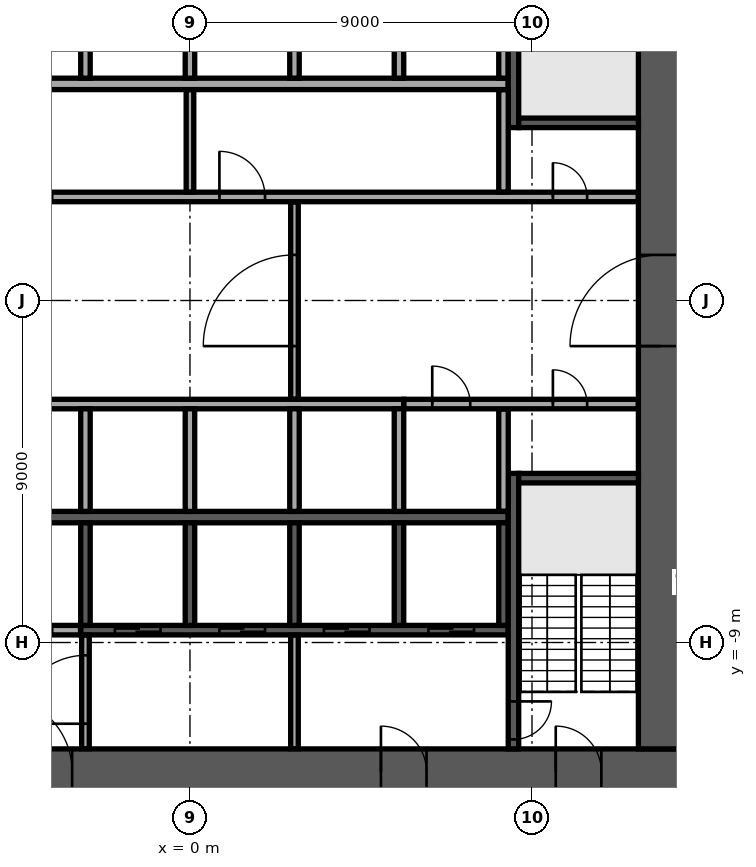
"""IFC4 building model, lengths in metres.
Left out: names, types, materials, properties, quantities, classifications, styles, units other than length and angle.
Written with IfcOpenShell. Run it as: python <this file> out.ifc"""

import sys

from ifc_helpers import new_model, si_unit, direction, frame, frame_2d, origin, place, context, subcontext, project, spatial, rectangle, extrude, element, fill, save


model = new_model("IFC4")
c1 = context("Model", 3, precision=1e-05, world=origin(), true_north=direction((0.0, 1.0)))
c2 = subcontext(c1, "Body", "Model", "MODEL_VIEW")
j1 = project(units=[si_unit("LENGTHUNIT", "METRE"), si_unit("PLANEANGLEUNIT", "RADIAN")], contexts=[c1])
p1 = place(None, origin())
s1 = spatial("IfcSite", under=j1, at=p1, CompositionType="ELEMENT")
p2 = place(p1, origin())
s2 = spatial("IfcBuilding", under=s1, at=p2, CompositionType="ELEMENT")
p3 = place(p2, frame((0.0, 0.0, 68.1)))
s3 = spatial("IfcBuildingStorey", under=s2, at=p3, CompositionType="ELEMENT", Elevation=68.1)
p4 = place(p3, frame((-13.0, -12.4, 0.0), z_axis=(0.0, 0.0, 1.0), x_axis=(1.0, 0.0, 0.0)))
e1 = element("IfcWall", 1, at=p4, inside=s3, PredefinedType="SHEAR", context=c2, shape_type="SweptSolid", body=[
    extrude(rectangle(XDim=26.0, YDim=1.2, at=frame_2d((13.0, 0.0))), origin(), (0.0, 0.0, 1.0), 3.75),
])
p5 = place(p4, frame((7.9, 0.0, 0.0)))
e2 = element("IfcOpeningElement", 2, at=p5, cuts=e1, PredefinedType="OPENING", context=c2, shape_type="SweptSolid", body=[
    extrude(rectangle(XDim=2.0, YDim=2.1, at=frame_2d((1.0, 1.05))), frame((0.0, 0.61, 0.0), z_axis=(0.0, -1.0, 0.0), x_axis=(1.0, 0.0, 0.0)), (0.0, 0.0, 1.0), 1.22),
])
p6 = place(p4, frame((18.025, 0.0, 0.0)))
e3 = element("IfcOpeningElement", 3, at=p6, cuts=e1, PredefinedType="OPENING", context=c2, shape_type="SweptSolid", body=[
    extrude(rectangle(XDim=1.2, YDim=2.1, at=frame_2d((0.6, 1.05))), frame((0.0, 0.61, 0.0), z_axis=(0.0, -1.0, 0.0), x_axis=(1.0, 0.0, 0.0)), (0.0, 0.0, 1.0), 1.22),
])
p7 = place(p4, frame((2.175, 0.0, 0.0)))
e4 = element("IfcOpeningElement", 4, at=p7, cuts=e1, PredefinedType="OPENING", context=c2, shape_type="SweptSolid", body=[
    extrude(rectangle(XDim=1.2, YDim=2.1, at=frame_2d((0.6, 1.05))), frame((0.0, 0.61, 0.0), z_axis=(0.0, -1.0, 0.0), x_axis=(1.0, 0.0, 0.0)), (0.0, 0.0, 1.0), 1.22),
])
p8 = place(p4, frame((22.625, 0.0, 0.0)))
e5 = element("IfcOpeningElement", 5, at=p8, cuts=e1, PredefinedType="OPENING", context=c2, shape_type="SweptSolid", body=[
    extrude(rectangle(XDim=1.2, YDim=2.1, at=frame_2d((0.6, 1.05))), frame((0.0, 0.61, 0.0), z_axis=(0.0, -1.0, 0.0), x_axis=(1.0, 0.0, 0.0)), (0.0, 0.0, 1.0), 1.22),
])
p9 = place(p3, frame((12.4, -11.8, 0.0), z_axis=(0.0, 0.0, 1.0), x_axis=(0.0, 1.0, 0.0)))
e6 = element("IfcWall", 6, at=p9, inside=s3, PredefinedType="SHEAR", context=c2, shape_type="SweptSolid", body=[
    extrude(rectangle(XDim=23.6, YDim=1.2, at=frame_2d((11.8, 0.0))), origin(), (0.0, 0.0, 1.0), 3.75),
])
p10 = place(p9, frame((10.6, 0.0, 0.0)))
e7 = element("IfcOpeningElement", 7, at=p10, cuts=e6, PredefinedType="OPENING", context=c2, shape_type="SweptSolid", body=[
    extrude(rectangle(XDim=2.4, YDim=2.4, at=frame_2d((1.2, 1.2))), frame((0.0, 0.61, 0.0), z_axis=(0.0, -1.0, 0.0), x_axis=(1.0, 0.0, 0.0)), (0.0, 0.0, 1.0), 1.22),
])
for number, where, z_axis, x_axis in (
    (8, (-8.375, 5.7, 0.0), (0.0, 0.0, 1.0), (1.0, 0.0, 0.0)),
    (9, (-8.375, -5.7, 0.0), (0.0, 0.0, 1.0), (1.0, 0.0, 0.0)),
):
    element("IfcWall", number, at=place(p3, frame(where, z_axis=z_axis, x_axis=x_axis)), inside=s3, PredefinedType="SOLIDWALL", context=c2, shape_type="SweptSolid", body=[
        extrude(rectangle(XDim=16.75, YDim=0.3, at=frame_2d((8.375, 0.0))), origin(), (0.0, 0.0, 1.0), 3.75),
    ])
for number, where, z_axis, x_axis in (
    (10, (-2.75, 5.85, 0.0), (0.0, 0.0, 1.0), (0.0, 1.0, 0.0)),
    (11, (0.0, 5.85, 0.0), (0.0, 0.0, 1.0), (0.0, 1.0, 0.0)),
    (12, (2.75, 5.85, 0.0), (0.0, 0.0, 1.0), (0.0, 1.0, 0.0)),
    (13, (5.5, 5.85, 0.0), (0.0, 0.0, 1.0), (0.0, 1.0, 0.0)),
    (14, (8.25, 5.85, 0.0), (0.0, 0.0, 1.0), (0.0, 1.0, 0.0)),
):
    element("IfcWall", number, at=place(p3, frame(where, z_axis=z_axis, x_axis=x_axis)), inside=s3, PredefinedType="SOLIDWALL", context=c2, shape_type="SweptSolid", body=[
        extrude(rectangle(XDim=2.7, YDim=0.25, at=frame_2d((1.35, 0.0))), origin(), (0.0, 0.0, 1.0), 3.75),
    ])
p11 = place(p3, frame((-8.375, -2.725, 0.0), z_axis=(0.0, 0.0, 1.0), x_axis=(1.0, 0.0, 0.0)))
e15 = element("IfcWall", 15, at=p11, inside=s3, PredefinedType="SOLIDWALL", context=c2, shape_type="SweptSolid", body=[
    extrude(rectangle(XDim=14.0, YDim=0.25, at=frame_2d((7.0, 0.0))), origin(), (0.0, 0.0, 1.0), 3.75),
])
for number, where, z_axis, x_axis in (
    (16, (-2.75, -5.55, 0.0), (0.0, 0.0, 1.0), (0.0, 1.0, 0.0)),
    (17, (0.0, -5.55, 0.0), (0.0, 0.0, 1.0), (0.0, 1.0, 0.0)),
    (18, (2.75, -5.55, 0.0), (0.0, 0.0, 1.0), (0.0, 1.0, 0.0)),
    (19, (5.5, -5.55, 0.0), (0.0, 0.0, 1.0), (0.0, 1.0, 0.0)),
):
    element("IfcWall", number, at=place(p3, frame(where, z_axis=z_axis, x_axis=x_axis)), inside=s3, PredefinedType="SOLIDWALL", context=c2, shape_type="SweptSolid", body=[
        extrude(rectangle(XDim=2.7, YDim=0.25, at=frame_2d((1.35, 0.0))), origin(), (0.0, 0.0, 1.0), 3.75),
    ])
p12 = place(p3, frame((-2.875, -8.675, 0.0), z_axis=(0.0, 0.0, 1.0), x_axis=(1.0, 0.0, 0.0)))
e20 = element("IfcWall", 20, at=p12, inside=s3, PredefinedType="SOLIDWALL", context=c2, shape_type="SweptSolid", body=[
    extrude(rectangle(XDim=11.25, YDim=0.25, at=frame_2d((5.625, 0.0))), origin(), (0.0, 0.0, 1.0), 3.75),
])
p13 = place(p12, frame((0.9, 0.0, 0.0)))
e21 = element("IfcOpeningElement", 21, at=p13, cuts=e20, PredefinedType="OPENING", context=c2, shape_type="SweptSolid", body=[
    extrude(rectangle(XDim=1.2, YDim=2.1, at=frame_2d((0.6, 1.05))), frame((0.0, 0.135, 0.0), z_axis=(0.0, -1.0, 0.0), x_axis=(1.0, 0.0, 0.0)), (0.0, 0.0, 1.0), 0.27),
])
p14 = place(p12, frame((3.65, 0.0, 0.0)))
e22 = element("IfcOpeningElement", 22, at=p14, cuts=e20, PredefinedType="OPENING", context=c2, shape_type="SweptSolid", body=[
    extrude(rectangle(XDim=1.2, YDim=2.1, at=frame_2d((0.6, 1.05))), frame((0.0, 0.135, 0.0), z_axis=(0.0, -1.0, 0.0), x_axis=(1.0, 0.0, 0.0)), (0.0, 0.0, 1.0), 0.27),
])
p15 = place(p12, frame((6.4, 0.0, 0.0)))
e23 = element("IfcOpeningElement", 23, at=p15, cuts=e20, PredefinedType="OPENING", context=c2, shape_type="SweptSolid", body=[
    extrude(rectangle(XDim=1.2, YDim=2.1, at=frame_2d((0.6, 1.05))), frame((0.0, 0.135, 0.0), z_axis=(0.0, -1.0, 0.0), x_axis=(1.0, 0.0, 0.0)), (0.0, 0.0, 1.0), 0.27),
])
p16 = place(p12, frame((9.15, 0.0, 0.0)))
e24 = element("IfcOpeningElement", 24, at=p16, cuts=e20, PredefinedType="OPENING", context=c2, shape_type="SweptSolid", body=[
    extrude(rectangle(XDim=1.2, YDim=2.1, at=frame_2d((0.6, 1.05))), frame((0.0, 0.135, 0.0), z_axis=(0.0, -1.0, 0.0), x_axis=(1.0, 0.0, 0.0)), (0.0, 0.0, 1.0), 0.27),
])
for number, where, z_axis, x_axis in (
    (25, (-2.75, -8.55, 0.0), (0.0, 0.0, 1.0), (0.0, 1.0, 0.0)),
    (26, (0.0, -8.55, 0.0), (0.0, 0.0, 1.0), (0.0, 1.0, 0.0)),
    (27, (2.75, -8.55, 0.0), (0.0, 0.0, 1.0), (0.0, 1.0, 0.0)),
    (28, (5.5, -8.55, 0.0), (0.0, 0.0, 1.0), (0.0, 1.0, 0.0)),
    (29, (8.25, -8.55, 0.0), (0.0, 0.0, 1.0), (0.0, 1.0, 0.0)),
):
    element("IfcWall", number, at=place(p3, frame(where, z_axis=z_axis, x_axis=x_axis)), inside=s3, PredefinedType="SOLIDWALL", context=c2, shape_type="SweptSolid", body=[
        extrude(rectangle(XDim=2.7, YDim=0.25, at=frame_2d((1.35, 0.0))), origin(), (0.0, 0.0, 1.0), 3.75),
    ])
p17 = place(p3, frame((8.512, 4.55, 0.0), z_axis=(0.0, 0.0, 1.0), x_axis=(0.0, 1.0, 0.0)))
e30 = element("IfcWall", 30, at=p17, inside=s3, PredefinedType="SOLIDWALL", context=c2, shape_type="SweptSolid", body=[
    extrude(rectangle(XDim=7.25, YDim=0.275, at=frame_2d((3.625, 0.0))), origin(), (0.0, 0.0, 1.0), 3.75),
])
p18 = place(p17, frame((6.0, 0.0, 0.0)))
e31 = element("IfcOpeningElement", 31, at=p18, cuts=e30, PredefinedType="OPENING", context=c2, shape_type="SweptSolid", body=[
    extrude(rectangle(XDim=1.0, YDim=2.1, at=frame_2d((0.5, 1.05))), frame((0.0, 0.147, 0.0), z_axis=(0.0, -1.0, 0.0), x_axis=(1.0, 0.0, 0.0)), (0.0, 0.0, 1.0), 0.295),
])
p19 = place(p3, frame((8.65, 4.675, 0.0), z_axis=(0.0, 0.0, 1.0), x_axis=(1.0, 0.0, 0.0)))
e32 = element("IfcWall", 32, at=p19, inside=s3, PredefinedType="SOLIDWALL", context=c2, shape_type="SweptSolid", body=[
    extrude(rectangle(XDim=3.15, YDim=0.25, at=frame_2d((1.575, 0.0))), origin(), (0.0, 0.0, 1.0), 3.75),
])
p20 = place(p3, frame((8.512, -4.55, 0.0), z_axis=(0.0, 0.0, 1.0), x_axis=(0.0, -1.0, 0.0)))
e33 = element("IfcWall", 33, at=p20, inside=s3, PredefinedType="SOLIDWALL", context=c2, shape_type="SweptSolid", body=[
    extrude(rectangle(XDim=7.25, YDim=0.275, at=frame_2d((3.625, 0.0))), origin(), (0.0, 0.0, 1.0), 3.75),
])
p21 = place(p20, frame((6.0, 0.0, 0.0)))
e34 = element("IfcOpeningElement", 34, at=p21, cuts=e33, PredefinedType="OPENING", context=c2, shape_type="SweptSolid", body=[
    extrude(rectangle(XDim=1.0, YDim=2.1, at=frame_2d((0.5, 1.05))), frame((0.0, 0.147, 0.0), z_axis=(0.0, -1.0, 0.0), x_axis=(1.0, 0.0, 0.0)), (0.0, 0.0, 1.0), 0.295),
])
p22 = place(p3, frame((8.65, -4.675, 0.0), z_axis=(0.0, 0.0, 1.0), x_axis=(1.0, 0.0, 0.0)))
e35 = element("IfcWall", 35, at=p22, inside=s3, PredefinedType="SOLIDWALL", context=c2, shape_type="SweptSolid", body=[
    extrude(rectangle(XDim=3.15, YDim=0.25, at=frame_2d((1.575, 0.0))), origin(), (0.0, 0.0, 1.0), 3.75),
])
p23 = place(p3, frame((-2.75, -11.795, 0.0), z_axis=(0.0, 0.0, 1.0), x_axis=(0.0, 1.0, 0.0)))
e36 = element("IfcWall", 36, at=p23, inside=s3, PredefinedType="PARTITIONING", context=c2, shape_type="SweptSolid", body=[
    extrude(rectangle(XDim=2.99, YDim=0.2, at=frame_2d((1.495, 0.0))), origin(), (0.0, 0.0, 1.0), 3.75),
])
p24 = place(p23, frame((0.657, 0.0, 0.0)))
e37 = element("IfcOpeningElement", 37, at=p24, cuts=e36, PredefinedType="OPENING", context=c2, shape_type="SweptSolid", body=[
    extrude(rectangle(XDim=1.8, YDim=2.1, at=frame_2d((0.9, 1.05))), frame((0.0, 0.11, 0.0), z_axis=(0.0, -1.0, 0.0), x_axis=(1.0, 0.0, 0.0)), (0.0, 0.0, 1.0), 0.22),
])
p25 = place(p3, frame((2.75, -11.795, 0.0), z_axis=(0.0, 0.0, 1.0), x_axis=(0.0, 1.0, 0.0)))
e38 = element("IfcWall", 38, at=p25, inside=s3, PredefinedType="PARTITIONING", context=c2, shape_type="SweptSolid", body=[
    extrude(rectangle(XDim=2.99, YDim=0.2, at=frame_2d((1.495, 0.0))), origin(), (0.0, 0.0, 1.0), 3.75),
])
p26 = place(p3, frame((-8.37, -8.675, 0.0), z_axis=(0.0, 0.0, 1.0), x_axis=(1.0, 0.0, 0.0)))
e39 = element("IfcWall", 39, at=p26, inside=s3, PredefinedType="PARTITIONING", context=c2, shape_type="SweptSolid", body=[
    extrude(rectangle(XDim=5.49, YDim=0.25, at=frame_2d((2.745, 0.0))), origin(), (0.0, 0.0, 1.0), 3.75),
])
p27 = place(p26, frame((0.995, 0.0, 0.0)))
e40 = element("IfcOpeningElement", 40, at=p27, cuts=e39, PredefinedType="OPENING", context=c2, shape_type="SweptSolid", body=[
    extrude(rectangle(XDim=1.0, YDim=2.1, at=frame_2d((0.5, 1.05))), frame((0.0, 0.135, 0.0), z_axis=(0.0, -1.0, 0.0), x_axis=(1.0, 0.0, 0.0)), (0.0, 0.0, 1.0), 0.27),
])
p28 = place(p26, frame((3.745, 0.0, 0.0)))
e41 = element("IfcOpeningElement", 41, at=p28, cuts=e39, PredefinedType="OPENING", context=c2, shape_type="SweptSolid", body=[
    extrude(rectangle(XDim=1.0, YDim=2.1, at=frame_2d((0.5, 1.05))), frame((0.0, 0.135, 0.0), z_axis=(0.0, -1.0, 0.0), x_axis=(1.0, 0.0, 0.0)), (0.0, 0.0, 1.0), 0.27),
])
p29 = place(p3, frame((8.25, -5.545, 0.0), z_axis=(0.0, 0.0, 1.0), x_axis=(0.0, 1.0, 0.0)))
e42 = element("IfcWall", 42, at=p29, inside=s3, PredefinedType="PARTITIONING", context=c2, shape_type="SweptSolid", body=[
    extrude(rectangle(XDim=2.69, YDim=0.25, at=frame_2d((1.345, 0.0))), origin(), (0.0, 0.0, 1.0), 3.75),
])
p30 = place(p3, frame((5.63, -2.725, 0.0), z_axis=(0.0, 0.0, 1.0), x_axis=(1.0, 0.0, 0.0)))
e43 = element("IfcWall", 43, at=p30, inside=s3, PredefinedType="PARTITIONING", context=c2, shape_type="SweptSolid", body=[
    extrude(rectangle(XDim=6.165, YDim=0.25, at=frame_2d((3.083, 0.0))), origin(), (0.0, 0.0, 1.0), 3.75),
])
p31 = place(p30, frame((0.745, 0.0, 0.0)))
e44 = element("IfcOpeningElement", 44, at=p31, cuts=e43, PredefinedType="OPENING", context=c2, shape_type="SweptSolid", body=[
    extrude(rectangle(XDim=1.0, YDim=2.1, at=frame_2d((0.5, 1.05))), frame((0.0, 0.135, 0.0), z_axis=(0.0, -1.0, 0.0), x_axis=(1.0, 0.0, 0.0)), (0.0, 0.0, 1.0), 0.27),
])
p32 = place(p30, frame((3.92, 0.0, 0.0)))
e45 = element("IfcOpeningElement", 45, at=p32, cuts=e43, PredefinedType="OPENING", context=c2, shape_type="SweptSolid", body=[
    extrude(rectangle(XDim=0.9, YDim=2.1, at=frame_2d((0.45, 1.05))), frame((0.0, 0.135, 0.0), z_axis=(0.0, -1.0, 0.0), x_axis=(1.0, 0.0, 0.0)), (0.0, 0.0, 1.0), 0.27),
])
p33 = place(p3, frame((2.75, -2.595, 0.0), z_axis=(0.0, 0.0, 1.0), x_axis=(0.0, 1.0, 0.0)))
e46 = element("IfcWall", 46, at=p33, inside=s3, PredefinedType="PARTITIONING", context=c2, shape_type="SweptSolid", body=[
    extrude(rectangle(XDim=5.19, YDim=0.2, at=frame_2d((2.595, 0.0))), origin(), (0.0, 0.0, 1.0), 3.75),
])
p34 = place(p33, frame((1.395, 0.0, 0.0)))
e47 = element("IfcOpeningElement", 47, at=p34, cuts=e46, PredefinedType="OPENING", context=c2, shape_type="SweptSolid", body=[
    extrude(rectangle(XDim=2.4, YDim=2.4, at=frame_2d((1.2, 1.2))), frame((0.0, 0.11, 0.0), z_axis=(0.0, -1.0, 0.0), x_axis=(1.0, 0.0, 0.0)), (0.0, 0.0, 1.0), 0.22),
])
p35 = place(p3, frame((-11.795, 2.725, 0.0), z_axis=(0.0, 0.0, 1.0), x_axis=(1.0, 0.0, 0.0)))
e48 = element("IfcWall", 48, at=p35, inside=s3, PredefinedType="PARTITIONING", context=c2, shape_type="SweptSolid", body=[
    extrude(rectangle(XDim=23.59, YDim=0.25, at=frame_2d((11.795, 0.0))), origin(), (0.0, 0.0, 1.0), 3.75),
])
p36 = place(p35, frame((21.345, 0.0, 0.0)))
e49 = element("IfcOpeningElement", 49, at=p36, cuts=e48, PredefinedType="OPENING", context=c2, shape_type="SweptSolid", body=[
    extrude(rectangle(XDim=0.9, YDim=2.1, at=frame_2d((0.45, 1.05))), frame((0.0, 0.135, 0.0), z_axis=(0.0, -1.0, 0.0), x_axis=(1.0, 0.0, 0.0)), (0.0, 0.0, 1.0), 0.27),
])
p37 = place(p35, frame((1.345, 0.0, 0.0)))
e50 = element("IfcOpeningElement", 50, at=p37, cuts=e48, PredefinedType="OPENING", context=c2, shape_type="SweptSolid", body=[
    extrude(rectangle(XDim=0.9, YDim=2.1, at=frame_2d((0.45, 1.05))), frame((0.0, 0.135, 0.0), z_axis=(0.0, -1.0, 0.0), x_axis=(1.0, 0.0, 0.0)), (0.0, 0.0, 1.0), 0.27),
])
p38 = place(p35, frame((4.42, 0.0, 0.0)))
e51 = element("IfcOpeningElement", 51, at=p38, cuts=e48, PredefinedType="OPENING", context=c2, shape_type="SweptSolid", body=[
    extrude(rectangle(XDim=1.0, YDim=2.1, at=frame_2d((0.5, 1.05))), frame((0.0, 0.135, 0.0), z_axis=(0.0, -1.0, 0.0), x_axis=(1.0, 0.0, 0.0)), (0.0, 0.0, 1.0), 0.27),
])
p39 = place(p35, frame((7.17, 0.0, 0.0)))
e52 = element("IfcOpeningElement", 52, at=p39, cuts=e48, PredefinedType="OPENING", context=c2, shape_type="SweptSolid", body=[
    extrude(rectangle(XDim=1.0, YDim=2.1, at=frame_2d((0.5, 1.05))), frame((0.0, 0.135, 0.0), z_axis=(0.0, -1.0, 0.0), x_axis=(1.0, 0.0, 0.0)), (0.0, 0.0, 1.0), 0.27),
])
p40 = place(p35, frame((12.57, 0.0, 0.0)))
e53 = element("IfcOpeningElement", 53, at=p40, cuts=e48, PredefinedType="OPENING", context=c2, shape_type="SweptSolid", body=[
    extrude(rectangle(XDim=1.2, YDim=2.1, at=frame_2d((0.6, 1.05))), frame((0.0, 0.135, 0.0), z_axis=(0.0, -1.0, 0.0), x_axis=(1.0, 0.0, 0.0)), (0.0, 0.0, 1.0), 0.27),
])
p41 = place(p3, frame((0.0, 2.855, 0.0), z_axis=(0.0, 0.0, 1.0), x_axis=(0.0, 1.0, 0.0)))
e54 = element("IfcWall", 54, at=p41, inside=s3, PredefinedType="PARTITIONING", context=c2, shape_type="SweptSolid", body=[
    extrude(rectangle(XDim=2.69, YDim=0.2, at=frame_2d((1.345, 0.0))), origin(), (0.0, 0.0, 1.0), 3.75),
])
p42 = place(p3, frame((8.25, 2.855, 0.0), z_axis=(0.0, 0.0, 1.0), x_axis=(0.0, 1.0, 0.0)))
e55 = element("IfcWall", 55, at=p42, inside=s3, PredefinedType="PARTITIONING", context=c2, shape_type="SweptSolid", body=[
    extrude(rectangle(XDim=2.69, YDim=0.25, at=frame_2d((1.345, 0.0))), origin(), (0.0, 0.0, 1.0), 3.75),
])
p43 = place(p5, origin())
e56 = element("IfcDoor", 56, at=p43, inside=s3, OperationType="SINGLE_SWING_LEFT", PredefinedType="DOOR", context=c2, shape_type="SweptSolid", body=[
    extrude(rectangle(XDim=2.0, YDim=2.1, at=frame_2d((1.0, 1.05))), frame((0.0, 0.025, 0.0), z_axis=(0.0, -1.0, 0.0), x_axis=(1.0, 0.0, 0.0)), (0.0, 0.0, 1.0), 0.05),
])
fill(e2, e56)
p44 = place(p6, origin())
e57 = element("IfcDoor", 57, at=p44, inside=s3, OperationType="SINGLE_SWING_LEFT", PredefinedType="DOOR", context=c2, shape_type="SweptSolid", body=[
    extrude(rectangle(XDim=1.2, YDim=2.1, at=frame_2d((0.6, 1.05))), frame((0.0, 0.025, 0.0), z_axis=(0.0, -1.0, 0.0), x_axis=(1.0, 0.0, 0.0)), (0.0, 0.0, 1.0), 0.05),
])
fill(e3, e57)
p45 = place(p8, origin())
e58 = element("IfcDoor", 58, at=p45, inside=s3, OperationType="SINGLE_SWING_LEFT", PredefinedType="DOOR", context=c2, shape_type="SweptSolid", body=[
    extrude(rectangle(XDim=1.2, YDim=2.1, at=frame_2d((0.6, 1.05))), frame((0.0, 0.025, 0.0), z_axis=(0.0, -1.0, 0.0), x_axis=(1.0, 0.0, 0.0)), (0.0, 0.0, 1.0), 0.05),
])
fill(e5, e58)
p46 = place(p10, origin())
e59 = element("IfcDoor", 59, at=p46, inside=s3, OperationType="SINGLE_SWING_LEFT", PredefinedType="DOOR", context=c2, shape_type="SweptSolid", body=[
    extrude(rectangle(XDim=2.4, YDim=2.4, at=frame_2d((1.2, 1.2))), frame((0.0, 0.025, 0.0), z_axis=(0.0, -1.0, 0.0), x_axis=(1.0, 0.0, 0.0)), (0.0, 0.0, 1.0), 0.05),
])
fill(e7, e59)
p47 = place(p13, origin())
e60 = element("IfcDoor", 60, at=p47, inside=s3, OperationType="DOUBLE_DOOR_SLIDING", PredefinedType="DOOR", context=c2, shape_type="SweptSolid", body=[
    extrude(rectangle(XDim=1.2, YDim=2.1, at=frame_2d((0.6, 1.05))), frame((0.0, 0.025, 0.0), z_axis=(0.0, -1.0, 0.0), x_axis=(1.0, 0.0, 0.0)), (0.0, 0.0, 1.0), 0.05),
])
fill(e21, e60)
p48 = place(p14, origin())
e61 = element("IfcDoor", 61, at=p48, inside=s3, OperationType="DOUBLE_DOOR_SLIDING", PredefinedType="DOOR", context=c2, shape_type="SweptSolid", body=[
    extrude(rectangle(XDim=1.2, YDim=2.1, at=frame_2d((0.6, 1.05))), frame((0.0, 0.025, 0.0), z_axis=(0.0, -1.0, 0.0), x_axis=(1.0, 0.0, 0.0)), (0.0, 0.0, 1.0), 0.05),
])
fill(e22, e61)
p49 = place(p15, origin())
e62 = element("IfcDoor", 62, at=p49, inside=s3, OperationType="DOUBLE_DOOR_SLIDING", PredefinedType="DOOR", context=c2, shape_type="SweptSolid", body=[
    extrude(rectangle(XDim=1.2, YDim=2.1, at=frame_2d((0.6, 1.05))), frame((0.0, 0.025, 0.0), z_axis=(0.0, -1.0, 0.0), x_axis=(1.0, 0.0, 0.0)), (0.0, 0.0, 1.0), 0.05),
])
fill(e23, e62)
p50 = place(p16, origin())
e63 = element("IfcDoor", 63, at=p50, inside=s3, OperationType="DOUBLE_DOOR_SLIDING", PredefinedType="DOOR", context=c2, shape_type="SweptSolid", body=[
    extrude(rectangle(XDim=1.2, YDim=2.1, at=frame_2d((0.6, 1.05))), frame((0.0, 0.025, 0.0), z_axis=(0.0, -1.0, 0.0), x_axis=(1.0, 0.0, 0.0)), (0.0, 0.0, 1.0), 0.05),
])
fill(e24, e63)
p51 = place(p21, origin())
e64 = element("IfcDoor", 64, at=p51, inside=s3, OperationType="SINGLE_SWING_LEFT", PredefinedType="DOOR", context=c2, shape_type="SweptSolid", body=[
    extrude(rectangle(XDim=1.0, YDim=2.1, at=frame_2d((0.5, 1.05))), frame((0.0, 0.025, 0.0), z_axis=(0.0, -1.0, 0.0), x_axis=(1.0, 0.0, 0.0)), (0.0, 0.0, 1.0), 0.05),
])
fill(e34, e64)
p52 = place(p31, origin())
e65 = element("IfcDoor", 65, at=p52, inside=s3, OperationType="SINGLE_SWING_RIGHT", PredefinedType="DOOR", context=c2, shape_type="SweptSolid", body=[
    extrude(rectangle(XDim=1.0, YDim=2.1, at=frame_2d((0.5, 1.05))), frame((0.0, 0.025, 0.0), z_axis=(0.0, -1.0, 0.0), x_axis=(1.0, 0.0, 0.0)), (0.0, 0.0, 1.0), 0.05),
])
fill(e44, e65)
p53 = place(p36, origin())
e66 = element("IfcDoor", 66, at=p53, inside=s3, OperationType="SINGLE_SWING_RIGHT", PredefinedType="DOOR", context=c2, shape_type="SweptSolid", body=[
    extrude(rectangle(XDim=0.9, YDim=2.1, at=frame_2d((0.45, 1.05))), frame((0.0, 0.025, 0.0), z_axis=(0.0, -1.0, 0.0), x_axis=(1.0, 0.0, 0.0)), (0.0, 0.0, 1.0), 0.05),
])
fill(e49, e66)
p54 = place(p32, origin())
e67 = element("IfcDoor", 67, at=p54, inside=s3, OperationType="SINGLE_SWING_RIGHT", PredefinedType="DOOR", context=c2, shape_type="SweptSolid", body=[
    extrude(rectangle(XDim=0.9, YDim=2.1, at=frame_2d((0.45, 1.05))), frame((0.0, 0.025, 0.0), z_axis=(0.0, -1.0, 0.0), x_axis=(1.0, 0.0, 0.0)), (0.0, 0.0, 1.0), 0.05),
])
fill(e45, e67)
p55 = place(p40, origin())
e68 = element("IfcDoor", 68, at=p55, inside=s3, OperationType="SINGLE_SWING_LEFT", PredefinedType="DOOR", context=c2, shape_type="SweptSolid", body=[
    extrude(rectangle(XDim=1.2, YDim=2.1, at=frame_2d((0.6, 1.05))), frame((0.0, 0.025, 0.0), z_axis=(0.0, -1.0, 0.0), x_axis=(1.0, 0.0, 0.0)), (0.0, 0.0, 1.0), 0.05),
])
fill(e53, e68)
p56 = place(p34, origin())
e69 = element("IfcDoor", 69, at=p56, inside=s3, OperationType="DOUBLE_DOOR_DOUBLE_SWING", PredefinedType="DOOR", context=c2, shape_type="SweptSolid", body=[
    extrude(rectangle(XDim=2.4, YDim=2.4, at=frame_2d((1.2, 1.2))), frame((0.0, 0.025, 0.0), z_axis=(0.0, -1.0, 0.0), x_axis=(1.0, 0.0, 0.0)), (0.0, 0.0, 1.0), 0.05),
])
fill(e47, e69)
p57 = place(p24, origin())
e70 = element("IfcDoor", 70, at=p57, inside=s3, OperationType="SINGLE_SWING_LEFT", PredefinedType="DOOR", context=c2, shape_type="SweptSolid", body=[
    extrude(rectangle(XDim=1.8, YDim=2.1, at=frame_2d((0.9, 1.05))), frame((0.0, 0.025, 0.0), z_axis=(0.0, -1.0, 0.0), x_axis=(1.0, 0.0, 0.0)), (0.0, 0.0, 1.0), 0.05),
])
fill(e37, e70)
save(model, sys.argv[1])
